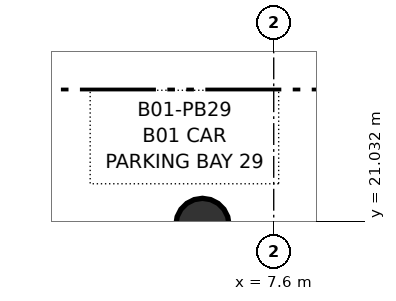
"""IFC4 building model, lengths in metres.
Left out: names, types, materials, properties, quantities, classifications, styles, units other than length and angle.
Written with IfcOpenShell. Run it as: python <this file> out.ifc"""

import sys

from ifc_helpers import new_model, si_unit, direction, frame, origin, origin_2d, place, context, subcontext, project, spatial, circle, extrude, source, transform, mapped, element, save


model = new_model("IFC4")
c1 = context("Model", 3, precision=1e-05, world=origin(), true_north=direction((0.0, 1.0)))
c2 = subcontext(c1, "Body", "Model", "MODEL_VIEW")
j1 = project(units=[si_unit("LENGTHUNIT", "METRE"), si_unit("PLANEANGLEUNIT", "RADIAN")], contexts=[c1])
p1 = place(None, origin())
s1 = spatial("IfcSite", under=j1, at=p1, CompositionType="ELEMENT")
p2 = place(p1, origin())
s2 = spatial("IfcBuilding", under=s1, at=p2, CompositionType="ELEMENT")
p3 = place(p2, frame((0.0, 0.0, -4.2)))
s3 = spatial("IfcBuildingStorey", under=s2, at=p3, CompositionType="ELEMENT", Elevation=-4.2)
m1 = source(origin(), c2, "Body", "SweptSolid", [
    extrude(circle(Radius=0.7, at=origin_2d()), origin(), (0.0, 0.0, 1.0), 4.157),
])
p4 = place(p3, frame((5.725, 20.937, 0.0), z_axis=(0.0, 0.0, 1.0), x_axis=(1.0, 0.0, 0.0)))
e1 = element("IfcColumn", 1, at=p4, inside=s3, PredefinedType="COLUMN", context=c2, shape_type="MappedRepresentation", body=[
    mapped(m1, transform((0.0, 0.0, 0.0), x_axis=(1.0, 0.0, 0.0), y_axis=(0.0, 1.0, 0.0), z_axis=(0.0, 0.0, 1.0), scale=1.0)),
])
save(model, sys.argv[1])
